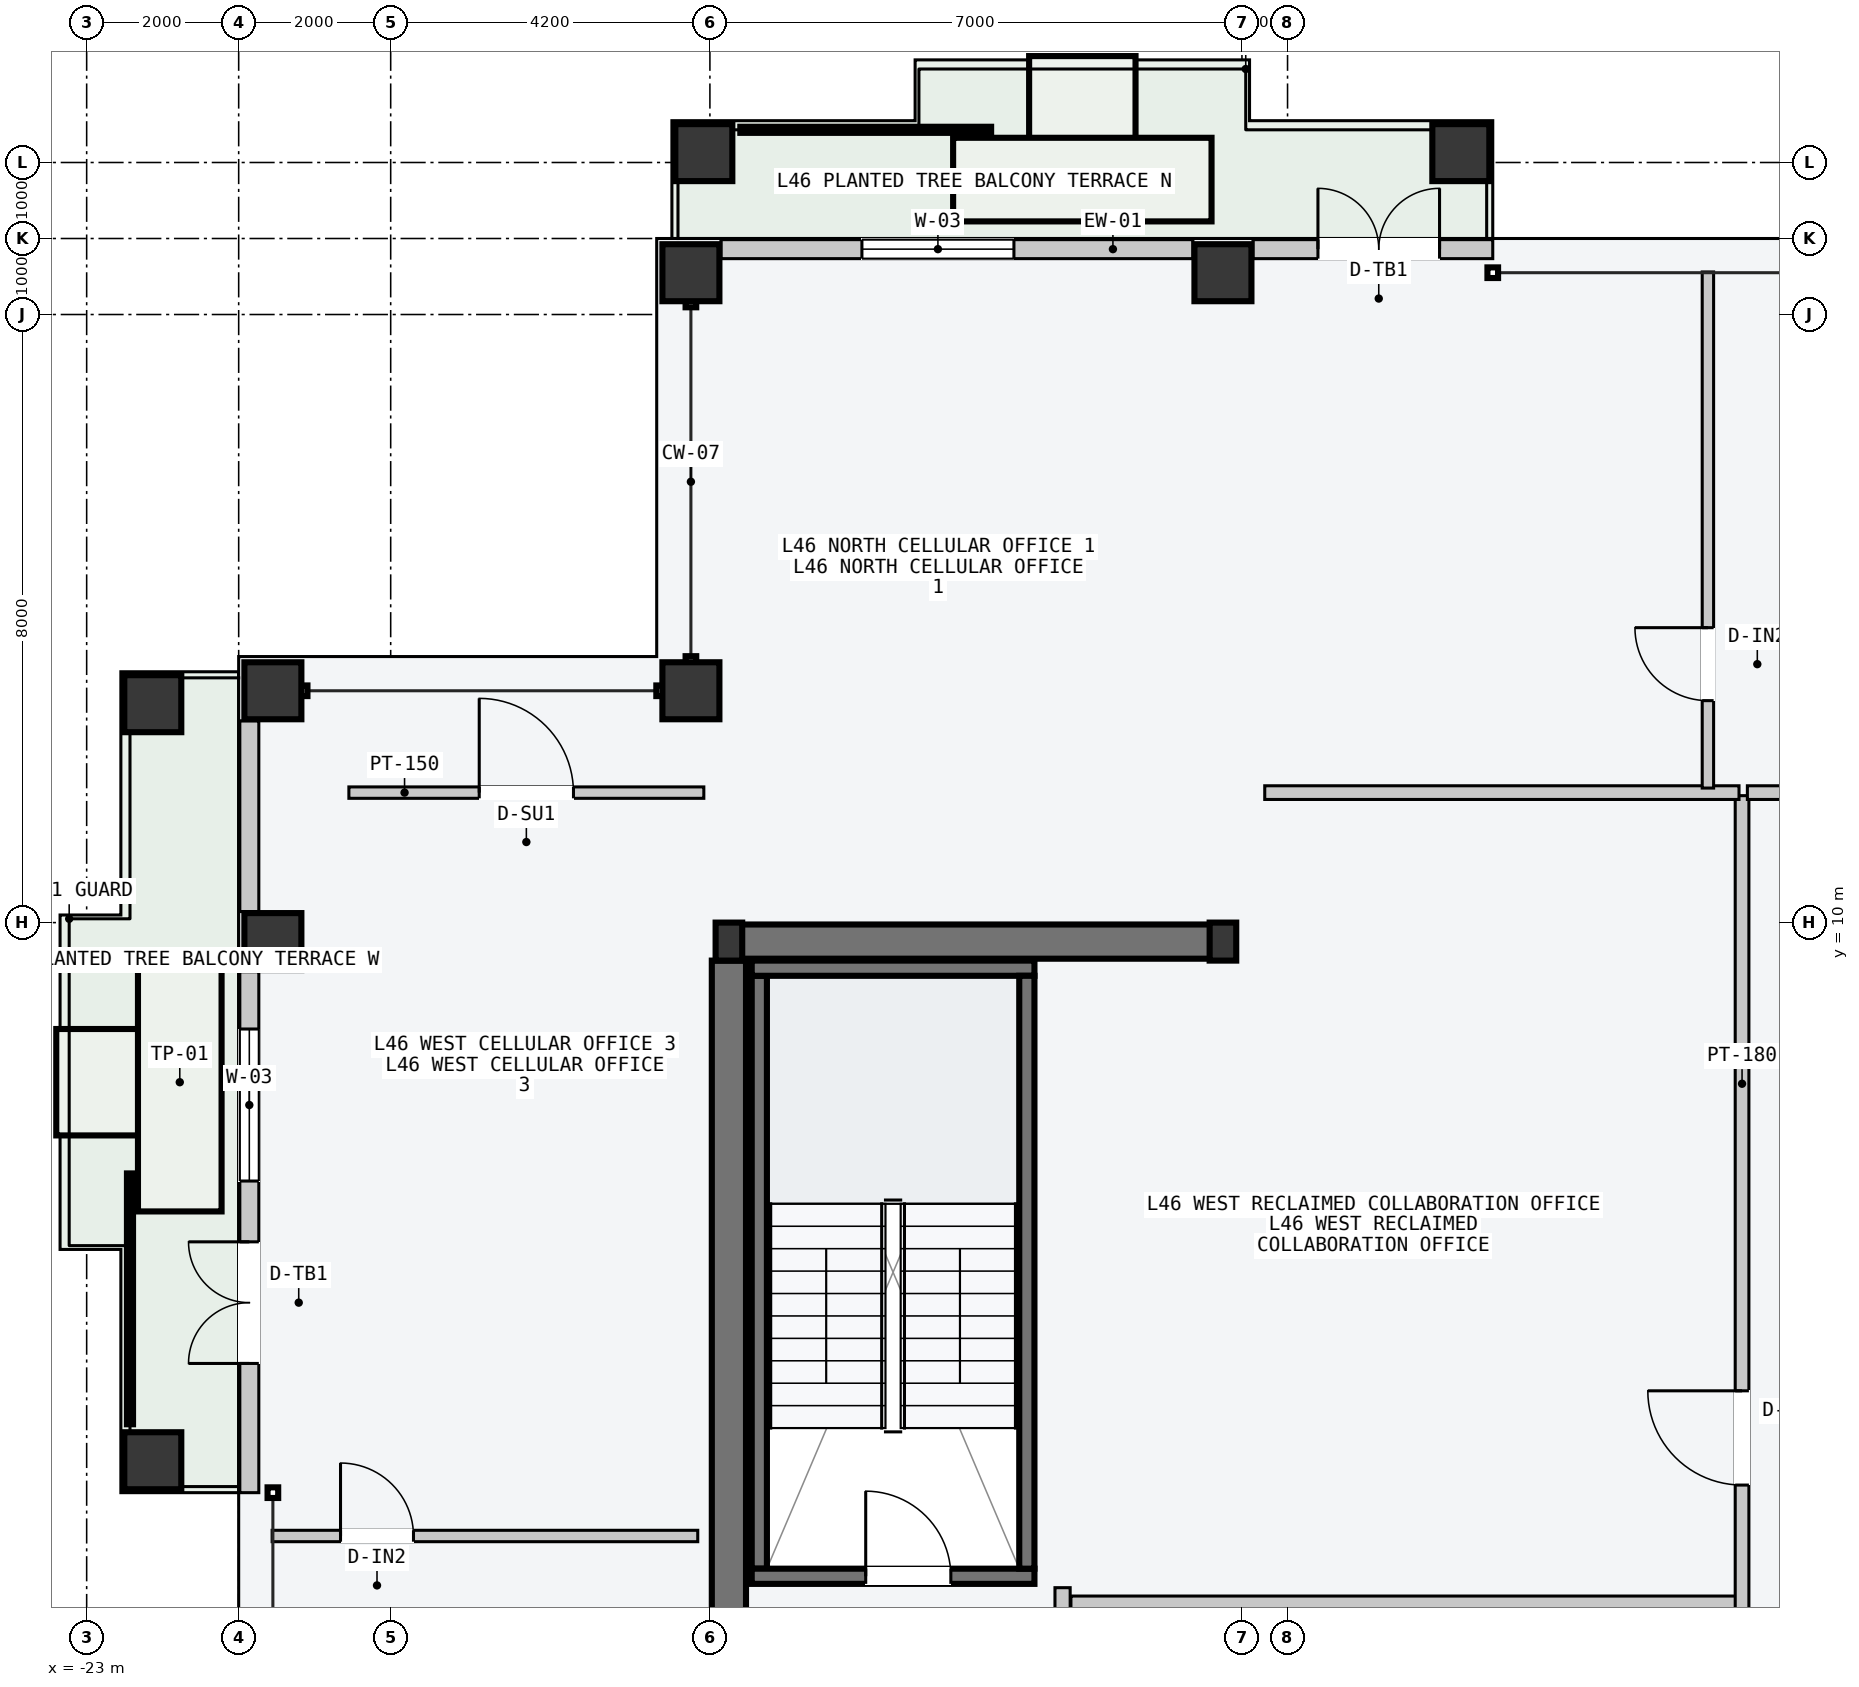
"""IFC4 building model, lengths in metres.
Left out: names, types, materials, properties, quantities, classifications, styles, units other than length and angle.
Written with IfcOpenShell. Run it as: python <this file> out.ifc"""

import sys

from ifc_helpers import new_model, si_unit, direction, frame, frame_2d, origin, origin_2d, place, context, subcontext, project, spatial, rectangle, hollow_rectangle, i_section, extrude, element, fill, save


model = new_model("IFC4")
c1 = context("Model", 3, precision=1e-05, world=origin(), true_north=direction((0.0, 1.0)))
c2 = subcontext(c1, "Body", "Model", "MODEL_VIEW")
j1 = project(units=[si_unit("LENGTHUNIT", "METRE"), si_unit("PLANEANGLEUNIT", "RADIAN")], contexts=[c1])
p1 = place(None, origin())
s1 = spatial("IfcSite", under=j1, at=p1, CompositionType="ELEMENT")
p2 = place(p1, origin())
s2 = spatial("IfcBuilding", under=s1, at=p2, CompositionType="ELEMENT")
p3 = place(p2, frame((0.0, 0.0, 176.7)))
s3 = spatial("IfcBuildingStorey", under=s2, at=p3, CompositionType="ELEMENT", Elevation=176.7)
p4 = place(p3, frame((-14.53, 9.75, -0.2), z_axis=(0.0, 0.0, 1.0), x_axis=(1.0, 0.0, 0.0)))
e1 = element("IfcWall", 1, at=p4, inside=s3, PredefinedType="SHEAR", context=c2, shape_type="SweptSolid", body=[
    extrude(rectangle(XDim=6.46, YDim=0.45, at=frame_2d((3.23, 0.0))), origin(), (0.0, 0.0, 1.0), 3.6),
])
p5 = place(p3, frame((-14.55, 0.25, -0.2), z_axis=(0.0, 0.0, 1.0), x_axis=(0.0, 1.0, 0.0)))
e2 = element("IfcWall", 2, at=p5, inside=s3, PredefinedType="SHEAR", context=c2, shape_type="SweptSolid", body=[
    extrude(rectangle(XDim=9.25, YDim=0.45, at=frame_2d((4.625, 0.0))), origin(), (0.0, 0.0, 1.0), 3.6),
])
p6 = place(p3, frame((-14.15, 1.5, -0.2), z_axis=(0.0, 0.0, 1.0), x_axis=(0.0, 1.0, 0.0)))
e3 = element("IfcWall", 3, at=p6, inside=s3, PredefinedType="SOLIDWALL", context=c2, shape_type="SweptSolid", body=[
    extrude(rectangle(XDim=7.8, YDim=0.2, at=frame_2d((3.9, 0.0))), origin(), (0.0, 0.0, 1.0), 3.6),
])
p7 = place(p3, frame((-14.25, 1.4, -0.2), z_axis=(0.0, 0.0, 1.0), x_axis=(1.0, 0.0, 0.0)))
e4 = element("IfcWall", 4, at=p7, inside=s3, PredefinedType="SOLIDWALL", context=c2, shape_type="SweptSolid", body=[
    extrude(rectangle(XDim=3.72, YDim=0.2, at=frame_2d((1.86, 0.0))), origin(), (0.0, 0.0, 1.0), 3.6),
])
p8 = place(p7, frame((1.5, 0.0, 0.2)))
e5 = element("IfcOpeningElement", 5, at=p8, cuts=e4, PredefinedType="OPENING", context=c2, shape_type="SweptSolid", body=[
    extrude(rectangle(XDim=1.12, YDim=2.18, at=frame_2d((0.56, 1.09))), frame((0.0, 0.11, 0.0), z_axis=(0.0, -1.0, 0.0), x_axis=(1.0, 0.0, 0.0)), (0.0, 0.0, 1.0), 0.22),
])
p9 = place(p3, frame((-14.25, 9.4, -0.2), z_axis=(0.0, 0.0, 1.0), x_axis=(1.0, 0.0, 0.0)))
e6 = element("IfcWall", 6, at=p9, inside=s3, PredefinedType="SOLIDWALL", context=c2, shape_type="SweptSolid", body=[
    extrude(rectangle(XDim=3.72, YDim=0.2, at=frame_2d((1.86, 0.0))), origin(), (0.0, 0.0, 1.0), 3.6),
])
p10 = place(p3, frame((-10.63, 1.5, -0.2), z_axis=(0.0, 0.0, 1.0), x_axis=(0.0, 1.0, 0.0)))
e7 = element("IfcWall", 7, at=p10, inside=s3, PredefinedType="SOLIDWALL", context=c2, shape_type="SweptSolid", body=[
    extrude(rectangle(XDim=7.8, YDim=0.2, at=frame_2d((3.9, 0.0))), origin(), (0.0, 0.0, 1.0), 3.6),
])
for number, where, z_axis, x_axis in (
    (8, (-14.55, 9.75, 0.0), (0.0, 0.0, 1.0), (1.0, 0.0, 0.0)),
    (9, (-8.05, 9.75, 0.0), (0.0, 0.0, 1.0), (1.0, 0.0, 0.0)),
):
    element("IfcColumn", number, at=place(p3, frame(where, z_axis=z_axis, x_axis=x_axis)), inside=s3, PredefinedType="COLUMN", context=c2, shape_type="SweptSolid", body=[
        extrude(i_section(OverallWidth=0.35, OverallDepth=0.5, WebThickness=0.02, FlangeThickness=0.032, at=origin_2d()), origin(), (0.0, 0.0, 1.0), 3.6),
    ])
for number, where, z_axis, x_axis in (
    (10, (-15.05, 18.55, 0.0), (0.0, 0.0, 1.0), (1.0, 0.0, 0.0)),
    (11, (-8.05, 18.55, 0.0), (0.0, 0.0, 1.0), (1.0, 0.0, 0.0)),
    (12, (-20.55, 9.75, 0.0), (0.0, 0.0, 1.0), (0.0, 1.0, 0.0)),
    (13, (-20.55, 13.05, 0.0), (0.0, 0.0, 1.0), (0.0, 1.0, 0.0)),
    (14, (-15.05, 13.05, 0.0), (0.0, 0.0, 1.0), (1.0, 0.0, 0.0)),
    (15, (-14.88, 20.13, 0.0), (0.0, 0.0, 1.0), (1.0, 0.0, 0.0)),
    (16, (-4.92, 20.13, 0.0), (0.0, 0.0, 1.0), (1.0, 0.0, 0.0)),
    (17, (-22.13, 2.92, 0.0), (0.0, 0.0, 1.0), (0.0, 1.0, 0.0)),
    (18, (-22.13, 12.88, 0.0), (0.0, 0.0, 1.0), (0.0, 1.0, 0.0)),
):
    element("IfcColumn", number, at=place(p3, frame(where, z_axis=z_axis, x_axis=x_axis)), inside=s3, PredefinedType="COLUMN", context=c2, shape_type="SweptSolid", body=[
        extrude(hollow_rectangle(XDim=0.75, YDim=0.75, WallThickness=0.032, at=origin_2d()), origin(), (0.0, 0.0, 1.0), 3.6),
    ])
p11 = place(p3, frame((-14.655, 18.86, 0.0), z_axis=(0.0, 0.0, 1.0), x_axis=(1.0, 0.0, 0.0)))
e19 = element("IfcWall", 19, at=p11, inside=s3, PredefinedType="STANDARD", context=c2, shape_type="SweptSolid", body=[
    extrude(rectangle(XDim=6.21, YDim=0.25, at=frame_2d((3.105, 0.0))), origin(), (0.0, 0.0, 1.0), 3.4),
])
p12 = place(p11, frame((1.855, 0.0, 0.85)))
e20 = element("IfcOpeningElement", 20, at=p12, cuts=e19, PredefinedType="OPENING", context=c2, shape_type="SweptSolid", body=[
    extrude(rectangle(XDim=2.0, YDim=2.1, at=frame_2d((1.0, 1.05))), frame((0.0, 0.135, 0.0), z_axis=(0.0, -1.0, 0.0), x_axis=(1.0, 0.0, 0.0)), (0.0, 0.0, 1.0), 0.27),
])
p13 = place(p3, frame((-7.655, 18.86, 0.0), z_axis=(0.0, 0.0, 1.0), x_axis=(1.0, 0.0, 0.0)))
e21 = element("IfcWall", 21, at=p13, inside=s3, PredefinedType="STANDARD", context=c2, shape_type="SweptSolid", body=[
    extrude(rectangle(XDim=3.155, YDim=0.25, at=frame_2d((1.578, 0.0))), origin(), (0.0, 0.0, 1.0), 3.4),
])
p14 = place(p13, frame((0.855, 0.0, 0.0)))
e22 = element("IfcOpeningElement", 22, at=p14, cuts=e21, PredefinedType="OPENING", context=c2, shape_type="SweptSolid", body=[
    extrude(rectangle(XDim=1.6, YDim=2.2, at=frame_2d((0.8, 1.1))), frame((0.0, 0.135, 0.0), z_axis=(0.0, -1.0, 0.0), x_axis=(1.0, 0.0, 0.0)), (0.0, 0.0, 1.0), 0.27),
])
p15 = place(p3, frame((-20.86, 2.5, 0.0), z_axis=(0.0, 0.0, 1.0), x_axis=(0.0, 1.0, 0.0)))
e23 = element("IfcWall", 23, at=p15, inside=s3, PredefinedType="STANDARD", context=c2, shape_type="SweptSolid", body=[
    extrude(rectangle(XDim=6.855, YDim=0.25, at=frame_2d((3.427, 0.0))), origin(), (0.0, 0.0, 1.0), 3.4),
])
p16 = place(p15, frame((1.7, 0.0, 0.0)))
e24 = element("IfcOpeningElement", 24, at=p16, cuts=e23, PredefinedType="OPENING", context=c2, shape_type="SweptSolid", body=[
    extrude(rectangle(XDim=1.6, YDim=2.2, at=frame_2d((0.8, 1.1))), frame((0.0, 0.135, 0.0), z_axis=(0.0, -1.0, 0.0), x_axis=(1.0, 0.0, 0.0)), (0.0, 0.0, 1.0), 0.27),
])
p17 = place(p15, frame((4.1, 0.0, 0.85)))
e25 = element("IfcOpeningElement", 25, at=p17, cuts=e23, PredefinedType="OPENING", context=c2, shape_type="SweptSolid", body=[
    extrude(rectangle(XDim=2.0, YDim=2.1, at=frame_2d((1.0, 1.05))), frame((0.0, 0.135, 0.0), z_axis=(0.0, -1.0, 0.0), x_axis=(1.0, 0.0, 0.0)), (0.0, 0.0, 1.0), 0.27),
])
p18 = place(p3, frame((-20.86, 10.145, 0.0), z_axis=(0.0, 0.0, 1.0), x_axis=(0.0, 1.0, 0.0)))
e26 = element("IfcWall", 26, at=p18, inside=s3, PredefinedType="STANDARD", context=c2, shape_type="SweptSolid", body=[
    extrude(rectangle(XDim=2.51, YDim=0.25, at=frame_2d((1.255, 0.0))), origin(), (0.0, 0.0, 1.0), 3.4),
])
p19 = place(p3, frame((-5.9, -9.45, 0.0), z_axis=(0.0, 0.0, 1.0), x_axis=(0.0, 1.0, 0.0)))
e27 = element("IfcWall", 27, at=p19, inside=s3, PredefinedType="PARTITIONING", context=c2, shape_type="SweptSolid", body=[
    extrude(rectangle(XDim=10.5, YDim=0.2, at=frame_2d((5.25, 0.0))), origin(), (0.0, 0.0, 1.0), 3.4),
])
p20 = place(p19, frame((3.9, 0.0, 0.0)))
e28 = element("IfcOpeningElement", 28, at=p20, cuts=e27, PredefinedType="OPENING", context=c2, shape_type="SweptSolid", body=[
    extrude(rectangle(XDim=1.5, YDim=2.2, at=frame_2d((0.75, 1.1))), frame((0.0, 0.11, 0.0), z_axis=(0.0, -1.0, 0.0), x_axis=(1.0, 0.0, 0.0)), (0.0, 0.0, 1.0), 0.22),
])
p21 = place(p3, frame((-10.16, -2.55, 0.0), z_axis=(0.0, 0.0, 1.0), x_axis=(0.0, 1.0, 0.0)))
e29 = element("IfcWall", 29, at=p21, inside=s3, PredefinedType="PARTITIONING", context=c2, shape_type="SweptSolid", body=[
    extrude(rectangle(XDim=3.8, YDim=0.2, at=frame_2d((1.9, 0.0))), origin(), (0.0, 0.0, 1.0), 3.4),
])
p22 = place(p21, frame((1.3, 0.0, 0.0)))
e30 = element("IfcOpeningElement", 30, at=p22, cuts=e29, PredefinedType="OPENING", context=c2, shape_type="SweptSolid", body=[
    extrude(rectangle(XDim=1.1, YDim=2.15, at=frame_2d((0.55, 1.075))), frame((0.0, 0.11, 0.0), z_axis=(0.0, -1.0, 0.0), x_axis=(1.0, 0.0, 0.0)), (0.0, 0.0, 1.0), 0.22),
])
p23 = place(p3, frame((-10.05, 1.05, 0.0), z_axis=(0.0, 0.0, 1.0), x_axis=(1.0, 0.0, 0.0)))
e31 = element("IfcWall", 31, at=p23, inside=s3, PredefinedType="PARTITIONING", context=c2, shape_type="SweptSolid", body=[
    extrude(rectangle(XDim=8.79, YDim=0.18, at=frame_2d((4.395, 0.0))), origin(), (0.0, 0.0, 1.0), 3.4),
])
p24 = place(p3, frame((-1.22, -3.5, 0.0), z_axis=(0.0, 0.0, 1.0), x_axis=(0.0, 1.0, 0.0)))
e32 = element("IfcWall", 32, at=p24, inside=s3, PredefinedType="PARTITIONING", context=c2, shape_type="SweptSolid", body=[
    extrude(rectangle(XDim=15.17, YDim=0.18, at=frame_2d((7.585, 0.0))), origin(), (0.0, 0.0, 1.0), 3.4),
])
p25 = place(p24, frame((6.1, 0.0, 0.0)))
e33 = element("IfcOpeningElement", 33, at=p25, cuts=e32, PredefinedType="OPENING", context=c2, shape_type="SweptSolid", body=[
    extrude(rectangle(XDim=1.24, YDim=2.24, at=frame_2d((0.62, 1.12))), frame((0.0, 0.1, 0.0), z_axis=(0.0, -1.0, 0.0), x_axis=(1.0, 0.0, 0.0)), (0.0, 0.0, 1.0), 0.2),
])
p26 = place(p24, frame((1.6, 0.0, 0.0)))
e34 = element("IfcOpeningElement", 34, at=p26, cuts=e32, PredefinedType="OPENING", context=c2, shape_type="SweptSolid", body=[
    extrude(rectangle(XDim=0.96, YDim=2.18, at=frame_2d((0.48, 1.09))), frame((0.0, 0.1, 0.0), z_axis=(0.0, -1.0, 0.0), x_axis=(1.0, 0.0, 0.0)), (0.0, 0.0, 1.0), 0.2),
])
p27 = place(p3, frame((-7.5, 11.71, 0.0), z_axis=(0.0, 0.0, 1.0), x_axis=(1.0, 0.0, 0.0)))
e35 = element("IfcWall", 35, at=p27, inside=s3, PredefinedType="PARTITIONING", context=c2, shape_type="SweptSolid", body=[
    extrude(rectangle(XDim=6.24, YDim=0.18, at=frame_2d((3.12, 0.0))), origin(), (0.0, 0.0, 1.0), 3.4),
])
p28 = place(p3, frame((-1.669, 11.77, 0.0), z_axis=(0.0, 0.0, 1.0), x_axis=(0.0, 1.0, 0.0)))
e36 = element("IfcWall", 36, at=p28, inside=s3, PredefinedType="PARTITIONING", context=c2, shape_type="SweptSolid", body=[
    extrude(rectangle(XDim=6.79, YDim=0.15, at=frame_2d((3.395, 0.0))), origin(), (0.0, 0.0, 1.0), 3.4),
])
p29 = place(p28, frame((1.15, 0.0, 0.0)))
e37 = element("IfcOpeningElement", 37, at=p29, cuts=e36, PredefinedType="OPENING", context=c2, shape_type="SweptSolid", body=[
    extrude(rectangle(XDim=0.96, YDim=2.18, at=frame_2d((0.48, 1.09))), frame((0.0, 0.085, 0.0), z_axis=(0.0, -1.0, 0.0), x_axis=(1.0, 0.0, 0.0)), (0.0, 0.0, 1.0), 0.17),
])
p30 = place(p3, frame((-1.15, 11.71, 0.0), z_axis=(0.0, 0.0, 1.0), x_axis=(1.0, 0.0, 0.0)))
e38 = element("IfcWall", 38, at=p30, inside=s3, PredefinedType="PARTITIONING", context=c2, shape_type="SweptSolid", body=[
    extrude(rectangle(XDim=2.3, YDim=0.18, at=frame_2d((1.15, 0.0))), origin(), (0.0, 0.0, 1.0), 3.4),
])
p31 = place(p30, frame((0.67, 0.0, 0.0)))
e39 = element("IfcOpeningElement", 39, at=p31, cuts=e38, PredefinedType="OPENING", context=c2, shape_type="SweptSolid", body=[
    extrude(rectangle(XDim=0.96, YDim=2.18, at=frame_2d((0.48, 1.09))), frame((0.0, 0.1, 0.0), z_axis=(0.0, -1.0, 0.0), x_axis=(1.0, 0.0, 0.0)), (0.0, 0.0, 1.0), 0.2),
])
p32 = place(p3, frame((-19.55, 11.71, 0.0), z_axis=(0.0, 0.0, 1.0), x_axis=(1.0, 0.0, 0.0)))
e40 = element("IfcWall", 40, at=p32, inside=s3, PredefinedType="PARTITIONING", context=c2, shape_type="SweptSolid", body=[
    extrude(rectangle(XDim=4.67, YDim=0.15, at=frame_2d((2.335, 0.0))), origin(), (0.0, 0.0, 1.0), 3.4),
])
p33 = place(p32, frame((1.715, 0.0, 0.0)))
e41 = element("IfcOpeningElement", 41, at=p33, cuts=e40, PredefinedType="OPENING", context=c2, shape_type="SweptSolid", body=[
    extrude(rectangle(XDim=1.24, YDim=2.24, at=frame_2d((0.62, 1.12))), frame((0.0, 0.085, 0.0), z_axis=(0.0, -1.0, 0.0), x_axis=(1.0, 0.0, 0.0)), (0.0, 0.0, 1.0), 0.17),
])
p34 = place(p3, frame((-20.56, 1.93, 0.0), z_axis=(0.0, 0.0, 1.0), x_axis=(1.0, 0.0, 0.0)))
e42 = element("IfcWall", 42, at=p34, inside=s3, PredefinedType="PARTITIONING", context=c2, shape_type="SweptSolid", body=[
    extrude(rectangle(XDim=5.6, YDim=0.15, at=frame_2d((2.8, 0.0))), origin(), (0.0, 0.0, 1.0), 3.4),
])
p35 = place(p34, frame((0.9, 0.0, 0.0)))
e43 = element("IfcOpeningElement", 43, at=p35, cuts=e42, PredefinedType="OPENING", context=c2, shape_type="SweptSolid", body=[
    extrude(rectangle(XDim=0.96, YDim=2.18, at=frame_2d((0.48, 1.09))), frame((0.0, 0.085, 0.0), z_axis=(0.0, -1.0, 0.0), x_axis=(1.0, 0.0, 0.0)), (0.0, 0.0, 1.0), 0.17),
])
p36 = place(p8, origin())
e44 = element("IfcDoor", 44, at=p36, inside=s3, OperationType="SINGLE_SWING_LEFT", PredefinedType="DOOR", context=c2, shape_type="SweptSolid", body=[
    extrude(rectangle(XDim=1.12, YDim=2.18, at=frame_2d((0.56, 1.09))), frame((0.0, 0.025, 0.0), z_axis=(0.0, -1.0, 0.0), x_axis=(1.0, 0.0, 0.0)), (0.0, 0.0, 1.0), 0.05),
])
fill(e5, e44)
p37 = place(p12, origin())
e45 = element("IfcWindow", 45, at=p37, inside=s3, PartitioningType="SINGLE_PANEL", PredefinedType="WINDOW", context=c2, shape_type="SweptSolid", body=[
    extrude(rectangle(XDim=2.0, YDim=2.1, at=frame_2d((1.0, 1.05))), frame((0.0, 0.03, 0.0), z_axis=(0.0, -1.0, 0.0), x_axis=(1.0, 0.0, 0.0)), (0.0, 0.0, 1.0), 0.06),
])
fill(e20, e45)
p38 = place(p14, origin())
e46 = element("IfcDoor", 46, at=p38, inside=s3, OperationType="DOUBLE_DOOR_SINGLE_SWING", PredefinedType="DOOR", context=c2, shape_type="SweptSolid", body=[
    extrude(rectangle(XDim=1.6, YDim=2.2, at=frame_2d((0.8, 1.1))), frame((0.0, 0.025, 0.0), z_axis=(0.0, -1.0, 0.0), x_axis=(1.0, 0.0, 0.0)), (0.0, 0.0, 1.0), 0.05),
])
fill(e22, e46)
p39 = place(p16, origin())
e47 = element("IfcDoor", 47, at=p39, inside=s3, OperationType="DOUBLE_DOOR_SINGLE_SWING", PredefinedType="DOOR", context=c2, shape_type="SweptSolid", body=[
    extrude(rectangle(XDim=1.6, YDim=2.2, at=frame_2d((0.8, 1.1))), frame((0.0, 0.025, 0.0), z_axis=(0.0, -1.0, 0.0), x_axis=(1.0, 0.0, 0.0)), (0.0, 0.0, 1.0), 0.05),
])
fill(e24, e47)
p40 = place(p17, origin())
e48 = element("IfcWindow", 48, at=p40, inside=s3, PartitioningType="SINGLE_PANEL", PredefinedType="WINDOW", context=c2, shape_type="SweptSolid", body=[
    extrude(rectangle(XDim=2.0, YDim=2.1, at=frame_2d((1.0, 1.05))), frame((0.0, 0.03, 0.0), z_axis=(0.0, -1.0, 0.0), x_axis=(1.0, 0.0, 0.0)), (0.0, 0.0, 1.0), 0.06),
])
fill(e25, e48)
p41 = place(p25, origin())
e49 = element("IfcDoor", 49, at=p41, inside=s3, OperationType="SINGLE_SWING_RIGHT", PredefinedType="DOOR", context=c2, shape_type="SweptSolid", body=[
    extrude(rectangle(XDim=1.24, YDim=2.24, at=frame_2d((0.62, 1.12))), frame((0.0, 0.025, 0.0), z_axis=(0.0, -1.0, 0.0), x_axis=(1.0, 0.0, 0.0)), (0.0, 0.0, 1.0), 0.05),
])
fill(e33, e49)
p42 = place(p29, origin())
e50 = element("IfcDoor", 50, at=p42, inside=s3, OperationType="SINGLE_SWING_RIGHT", PredefinedType="DOOR", context=c2, shape_type="SweptSolid", body=[
    extrude(rectangle(XDim=0.96, YDim=2.18, at=frame_2d((0.48, 1.09))), frame((0.0, 0.025, 0.0), z_axis=(0.0, -1.0, 0.0), x_axis=(1.0, 0.0, 0.0)), (0.0, 0.0, 1.0), 0.05),
])
fill(e37, e50)
p43 = place(p33, origin())
e51 = element("IfcDoor", 51, at=p43, inside=s3, OperationType="SINGLE_SWING_LEFT", PredefinedType="DOOR", context=c2, shape_type="SweptSolid", body=[
    extrude(rectangle(XDim=1.24, YDim=2.24, at=frame_2d((0.62, 1.12))), frame((0.0, 0.025, 0.0), z_axis=(0.0, -1.0, 0.0), x_axis=(1.0, 0.0, 0.0)), (0.0, 0.0, 1.0), 0.05),
])
fill(e41, e51)
p44 = place(p35, origin())
e52 = element("IfcDoor", 52, at=p44, inside=s3, OperationType="SINGLE_SWING_LEFT", PredefinedType="DOOR", context=c2, shape_type="SweptSolid", body=[
    extrude(rectangle(XDim=0.96, YDim=2.18, at=frame_2d((0.48, 1.09))), frame((0.0, 0.025, 0.0), z_axis=(0.0, -1.0, 0.0), x_axis=(1.0, 0.0, 0.0)), (0.0, 0.0, 1.0), 0.05),
])
fill(e43, e52)
save(model, sys.argv[1])
